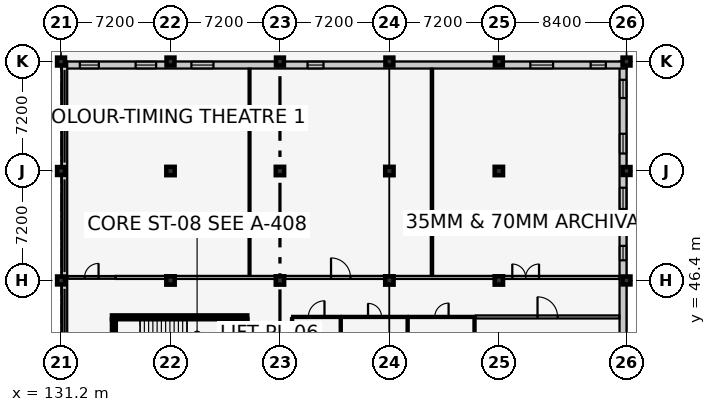
"""IFC4 building model, lengths in metres.
Left out: names, types, materials, properties, quantities, classifications, styles, units other than length and angle.
Written with IfcOpenShell. Run it as: python <this file> out.ifc"""

import sys

from ifc_helpers import new_model, si_unit, direction, frame, frame_2d, origin, origin_2d, place, context, subcontext, project, spatial, rectangle, extrude, element, fill, save


model = new_model("IFC4")
c1 = context("Model", 3, precision=1e-05, world=origin(), true_north=direction((0.0, 1.0)))
c2 = subcontext(c1, "Body", "Model", "MODEL_VIEW")
j1 = project(units=[si_unit("LENGTHUNIT", "METRE"), si_unit("PLANEANGLEUNIT", "RADIAN")], contexts=[c1])
p1 = place(None, origin())
s1 = spatial("IfcSite", under=j1, at=p1, CompositionType="ELEMENT")
p2 = place(p1, origin())
s2 = spatial("IfcBuilding", under=s1, at=p2, CompositionType="ELEMENT")
p3 = place(p2, frame((0.0, 0.0, 5.4)))
s3 = spatial("IfcBuildingStorey", under=s2, at=p3, CompositionType="ELEMENT", Elevation=5.4)
for number, where, z_axis, x_axis in (
    (1, (131.2, 46.4, 0.0), (0.0, 0.0, 1.0), (1.0, 0.0, 0.0)),
    (2, (131.2, 53.6, 0.0), (0.0, 0.0, 1.0), (1.0, 0.0, 0.0)),
    (3, (131.2, 60.8, 0.0), (0.0, 0.0, 1.0), (1.0, 0.0, 0.0)),
):
    element("IfcColumn", number, at=place(p3, frame(where, z_axis=z_axis, x_axis=x_axis)), inside=s3, PredefinedType="COLUMN", context=c2, shape_type="SweptSolid", body=[
        extrude(rectangle(XDim=0.52, YDim=0.52, at=origin_2d()), origin(), (0.0, 0.0, 1.0), 4.2),
    ])
for number, where, z_axis, x_axis in (
    (4, (138.4, 46.4, 0.0), (0.0, 0.0, 1.0), (1.0, 0.0, 0.0)),
    (5, (138.4, 53.6, 0.0), (0.0, 0.0, 1.0), (1.0, 0.0, 0.0)),
):
    element("IfcColumn", number, at=place(p3, frame(where, z_axis=z_axis, x_axis=x_axis)), inside=s3, PredefinedType="COLUMN", context=c2, shape_type="SweptSolid", body=[
        extrude(rectangle(XDim=0.55, YDim=0.55, at=origin_2d()), origin(), (0.0, 0.0, 1.0), 4.2),
    ])
p4 = place(p3, frame((138.4, 60.8, 0.0), z_axis=(0.0, 0.0, 1.0), x_axis=(1.0, 0.0, 0.0)))
e6 = element("IfcColumn", 6, at=p4, inside=s3, PredefinedType="COLUMN", context=c2, shape_type="SweptSolid", body=[
    extrude(rectangle(XDim=0.52, YDim=0.52, at=origin_2d()), origin(), (0.0, 0.0, 1.0), 4.2),
])
for number, where, z_axis, x_axis in (
    (7, (145.6, 46.4, 0.0), (0.0, 0.0, 1.0), (1.0, 0.0, 0.0)),
    (8, (145.6, 53.6, 0.0), (0.0, 0.0, 1.0), (1.0, 0.0, 0.0)),
):
    element("IfcColumn", number, at=place(p3, frame(where, z_axis=z_axis, x_axis=x_axis)), inside=s3, PredefinedType="COLUMN", context=c2, shape_type="SweptSolid", body=[
        extrude(rectangle(XDim=0.55, YDim=0.55, at=origin_2d()), origin(), (0.0, 0.0, 1.0), 4.2),
    ])
p5 = place(p3, frame((145.6, 60.8, 0.0), z_axis=(0.0, 0.0, 1.0), x_axis=(1.0, 0.0, 0.0)))
e9 = element("IfcColumn", 9, at=p5, inside=s3, PredefinedType="COLUMN", context=c2, shape_type="SweptSolid", body=[
    extrude(rectangle(XDim=0.52, YDim=0.52, at=origin_2d()), origin(), (0.0, 0.0, 1.0), 4.2),
])
for number, where, z_axis, x_axis in (
    (10, (152.8, 46.4, 0.0), (0.0, 0.0, 1.0), (1.0, 0.0, 0.0)),
    (11, (152.8, 53.6, 0.0), (0.0, 0.0, 1.0), (1.0, 0.0, 0.0)),
):
    element("IfcColumn", number, at=place(p3, frame(where, z_axis=z_axis, x_axis=x_axis)), inside=s3, PredefinedType="COLUMN", context=c2, shape_type="SweptSolid", body=[
        extrude(rectangle(XDim=0.55, YDim=0.55, at=origin_2d()), origin(), (0.0, 0.0, 1.0), 4.2),
    ])
p6 = place(p3, frame((152.8, 60.8, 0.0), z_axis=(0.0, 0.0, 1.0), x_axis=(1.0, 0.0, 0.0)))
e12 = element("IfcColumn", 12, at=p6, inside=s3, PredefinedType="COLUMN", context=c2, shape_type="SweptSolid", body=[
    extrude(rectangle(XDim=0.52, YDim=0.52, at=origin_2d()), origin(), (0.0, 0.0, 1.0), 4.2),
])
for number, where, z_axis, x_axis in (
    (13, (160.0, 46.4, 0.0), (0.0, 0.0, 1.0), (1.0, 0.0, 0.0)),
    (14, (160.0, 53.6, 0.0), (0.0, 0.0, 1.0), (1.0, 0.0, 0.0)),
):
    element("IfcColumn", number, at=place(p3, frame(where, z_axis=z_axis, x_axis=x_axis)), inside=s3, PredefinedType="COLUMN", context=c2, shape_type="SweptSolid", body=[
        extrude(rectangle(XDim=0.55, YDim=0.55, at=origin_2d()), origin(), (0.0, 0.0, 1.0), 4.2),
    ])
for number, where, z_axis, x_axis in (
    (15, (160.0, 60.8, 0.0), (0.0, 0.0, 1.0), (1.0, 0.0, 0.0)),
    (16, (168.4, 46.4, 0.0), (0.0, 0.0, 1.0), (1.0, 0.0, 0.0)),
    (17, (168.4, 53.6, 0.0), (0.0, 0.0, 1.0), (1.0, 0.0, 0.0)),
    (18, (168.4, 60.8, 0.0), (0.0, 0.0, 1.0), (1.0, 0.0, 0.0)),
):
    element("IfcColumn", number, at=place(p3, frame(where, z_axis=z_axis, x_axis=x_axis)), inside=s3, PredefinedType="COLUMN", context=c2, shape_type="SweptSolid", body=[
        extrude(rectangle(XDim=0.52, YDim=0.52, at=origin_2d()), origin(), (0.0, 0.0, 1.0), 4.2),
    ])
p7 = place(p3, frame((168.17, 60.8, 0.0), z_axis=(0.0, 0.0, 1.0), x_axis=(0.0, -1.0, 0.0)))
e19 = element("IfcWall", 19, at=p7, inside=s3, PredefinedType="SOLIDWALL", context=c2, shape_type="SweptSolid", body=[
    extrude(rectangle(XDim=21.6, YDim=0.46, at=frame_2d((10.8, 0.0))), origin(), (0.0, 0.0, 1.0), 3.215),
])
p8 = place(p7, frame((1.2, 0.0, 0.9)))
e20 = element("IfcOpeningElement", 20, at=p8, cuts=e19, PredefinedType="OPENING", context=c2, shape_type="SweptSolid", body=[
    extrude(rectangle(XDim=1.2, YDim=1.35, at=frame_2d((0.6, 0.675))), frame((0.0, 0.242, 0.0), z_axis=(0.0, -1.0, 0.0), x_axis=(1.0, 0.0, 0.0)), (0.0, 0.0, 1.0), 0.484),
])
p9 = place(p7, frame((4.75, 0.0, 0.9)))
e21 = element("IfcOpeningElement", 21, at=p9, cuts=e19, PredefinedType="OPENING", context=c2, shape_type="SweptSolid", body=[
    extrude(rectangle(XDim=1.3, YDim=1.35, at=frame_2d((0.65, 0.675))), frame((0.0, 0.242, 0.0), z_axis=(0.0, -1.0, 0.0), x_axis=(1.0, 0.0, 0.0)), (0.0, 0.0, 1.0), 0.484),
])
p10 = place(p7, frame((8.3, 0.0, 0.9)))
e22 = element("IfcOpeningElement", 22, at=p10, cuts=e19, PredefinedType="OPENING", context=c2, shape_type="SweptSolid", body=[
    extrude(rectangle(XDim=1.4, YDim=1.35, at=frame_2d((0.7, 0.675))), frame((0.0, 0.242, 0.0), z_axis=(0.0, -1.0, 0.0), x_axis=(1.0, 0.0, 0.0)), (0.0, 0.0, 1.0), 0.484),
])
p11 = place(p7, frame((12.125, 0.0, 0.9)))
e23 = element("IfcOpeningElement", 23, at=p11, cuts=e19, PredefinedType="OPENING", context=c2, shape_type="SweptSolid", body=[
    extrude(rectangle(XDim=0.95, YDim=1.45, at=frame_2d((0.475, 0.725))), frame((0.0, 0.242, 0.0), z_axis=(0.0, -1.0, 0.0), x_axis=(1.0, 0.0, 0.0)), (0.0, 0.0, 1.0), 0.484),
])
p12 = place(p7, frame((19.225, 0.0, 0.9)))
e24 = element("IfcOpeningElement", 24, at=p12, cuts=e19, PredefinedType="OPENING", context=c2, shape_type="SweptSolid", body=[
    extrude(rectangle(XDim=1.15, YDim=1.45, at=frame_2d((0.575, 0.725))), frame((0.0, 0.242, 0.0), z_axis=(0.0, -1.0, 0.0), x_axis=(1.0, 0.0, 0.0)), (0.0, 0.0, 1.0), 0.484),
])
p13 = place(p3, frame((131.2, 60.57, 0.0), z_axis=(0.0, 0.0, 1.0), x_axis=(1.0, 0.0, 0.0)))
e25 = element("IfcWall", 25, at=p13, inside=s3, PredefinedType="SOLIDWALL", context=c2, shape_type="SweptSolid", body=[
    extrude(rectangle(XDim=37.2, YDim=0.46, at=frame_2d((18.6, 0.0))), origin(), (0.0, 0.0, 1.0), 3.115),
])
p14 = place(p13, frame((1.235, 0.0, 0.9)))
e26 = element("IfcOpeningElement", 26, at=p14, cuts=e25, PredefinedType="OPENING", context=c2, shape_type="SweptSolid", body=[
    extrude(rectangle(XDim=1.25, YDim=1.45, at=frame_2d((0.625, 0.725))), frame((0.0, 0.242, 0.0), z_axis=(0.0, -1.0, 0.0), x_axis=(1.0, 0.0, 0.0)), (0.0, 0.0, 1.0), 0.484),
])
p15 = place(p13, frame((4.905, 0.0, 0.9)))
e27 = element("IfcOpeningElement", 27, at=p15, cuts=e25, PredefinedType="OPENING", context=c2, shape_type="SweptSolid", body=[
    extrude(rectangle(XDim=1.35, YDim=1.45, at=frame_2d((0.675, 0.725))), frame((0.0, 0.242, 0.0), z_axis=(0.0, -1.0, 0.0), x_axis=(1.0, 0.0, 0.0)), (0.0, 0.0, 1.0), 0.484),
])
p16 = place(p13, frame((8.575, 0.0, 0.9)))
e28 = element("IfcOpeningElement", 28, at=p16, cuts=e25, PredefinedType="OPENING", context=c2, shape_type="SweptSolid", body=[
    extrude(rectangle(XDim=1.45, YDim=1.45, at=frame_2d((0.725, 0.725))), frame((0.0, 0.242, 0.0), z_axis=(0.0, -1.0, 0.0), x_axis=(1.0, 0.0, 0.0)), (0.0, 0.0, 1.0), 0.484),
])
p17 = place(p13, frame((16.215, 0.0, 0.9)))
e29 = element("IfcOpeningElement", 29, at=p17, cuts=e25, PredefinedType="OPENING", context=c2, shape_type="SweptSolid", body=[
    extrude(rectangle(XDim=1.05, YDim=1.6, at=frame_2d((0.525, 0.8))), frame((0.0, 0.242, 0.0), z_axis=(0.0, -1.0, 0.0), x_axis=(1.0, 0.0, 0.0)), (0.0, 0.0, 1.0), 0.484),
])
p18 = place(p13, frame((30.87, 0.0, 0.9)))
e30 = element("IfcOpeningElement", 30, at=p18, cuts=e25, PredefinedType="OPENING", context=c2, shape_type="SweptSolid", body=[
    extrude(rectangle(XDim=1.5, YDim=1.6, at=frame_2d((0.75, 0.8))), frame((0.0, 0.242, 0.0), z_axis=(0.0, -1.0, 0.0), x_axis=(1.0, 0.0, 0.0)), (0.0, 0.0, 1.0), 0.484),
])
p19 = place(p13, frame((34.84, 0.0, 0.9)))
e31 = element("IfcOpeningElement", 31, at=p19, cuts=e25, PredefinedType="OPENING", context=c2, shape_type="SweptSolid", body=[
    extrude(rectangle(XDim=1.0, YDim=1.75, at=frame_2d((0.5, 0.875))), frame((0.0, 0.242, 0.0), z_axis=(0.0, -1.0, 0.0), x_axis=(1.0, 0.0, 0.0)), (0.0, 0.0, 1.0), 0.484),
])
p20 = place(p3, frame((131.43, 39.2, 0.0), z_axis=(0.0, 0.0, 1.0), x_axis=(0.0, 1.0, 0.0)))
e32 = element("IfcWall", 32, at=p20, inside=s3, PredefinedType="SOLIDWALL", context=c2, shape_type="SweptSolid", body=[
    extrude(rectangle(XDim=21.6, YDim=0.35, at=frame_2d((10.8, 0.0))), origin(), (0.0, 0.0, 1.0), 0.85),
])
p21 = place(p3, frame((143.45, 43.975, 0.0), z_axis=(0.0, 0.0, 1.0), x_axis=(-1.0, 0.0, 0.0)))
e33 = element("IfcWall", 33, at=p21, inside=s3, PredefinedType="SHEAR", context=c2, shape_type="SweptSolid", body=[
    extrude(rectangle(XDim=8.9, YDim=0.25, at=frame_2d((4.45, 0.0))), origin(), (0.0, 0.0, 1.0), 3.96),
])
p22 = place(p3, frame((134.675, 43.85, 0.0), z_axis=(0.0, 0.0, 1.0), x_axis=(0.0, -1.0, 0.0)))
e34 = element("IfcWall", 34, at=p22, inside=s3, PredefinedType="SHEAR", context=c2, shape_type="SweptSolid", body=[
    extrude(rectangle(XDim=3.45, YDim=0.25, at=frame_2d((1.725, 0.0))), origin(), (0.0, 0.0, 1.0), 3.96),
])
p23 = place(p22, frame((1.125, 0.0, 0.0)))
e35 = element("IfcOpeningElement", 35, at=p23, cuts=e34, PredefinedType="OPENING", context=c2, shape_type="SweptSolid", body=[
    extrude(rectangle(XDim=1.2, YDim=2.15, at=frame_2d((0.6, 1.075))), frame((0.0, 0.137, 0.0), z_axis=(0.0, -1.0, 0.0), x_axis=(1.0, 0.0, 0.0)), (0.0, 0.0, 1.0), 0.274),
])
p24 = place(p3, frame((143.325, 40.4, 0.0), z_axis=(0.0, 0.0, 1.0), x_axis=(0.0, 1.0, 0.0)))
e36 = element("IfcWall", 36, at=p24, inside=s3, PredefinedType="SHEAR", context=c2, shape_type="SweptSolid", body=[
    extrude(rectangle(XDim=3.45, YDim=0.25, at=frame_2d((1.725, 0.0))), origin(), (0.0, 0.0, 1.0), 3.96),
])
p25 = place(p3, frame((131.615, 46.6, 0.0), z_axis=(0.0, 0.0, 1.0), x_axis=(1.0, 0.0, 0.0)))
e37 = element("IfcWall", 37, at=p25, inside=s3, PredefinedType="PARTITIONING", context=c2, shape_type="SweptSolid", body=[
    extrude(rectangle(XDim=3.185, YDim=0.18, at=frame_2d((1.593, 0.0))), origin(), (0.0, 0.0, 1.0), 3.285),
])
p26 = place(p25, frame((1.133, 0.0, 0.0)))
e38 = element("IfcOpeningElement", 38, at=p26, cuts=e37, PredefinedType="OPENING", context=c2, shape_type="SweptSolid", body=[
    extrude(rectangle(XDim=0.92, YDim=2.08, at=frame_2d((0.46, 1.04))), frame((0.0, 0.102, 0.0), z_axis=(0.0, -1.0, 0.0), x_axis=(1.0, 0.0, 0.0)), (0.0, 0.0, 1.0), 0.204),
])
p27 = place(p3, frame((134.8, 46.6, 0.0), z_axis=(0.0, 0.0, 1.0), x_axis=(1.0, 0.0, 0.0)))
e39 = element("IfcWall", 39, at=p27, inside=s3, PredefinedType="PARTITIONING", context=c2, shape_type="SweptSolid", body=[
    extrude(rectangle(XDim=33.13, YDim=0.2, at=frame_2d((16.565, 0.0))), origin(), (0.0, 0.0, 1.0), 2.935),
])
p28 = place(p27, frame((14.16, 0.0, 0.0)))
e40 = element("IfcOpeningElement", 40, at=p28, cuts=e39, PredefinedType="OPENING", context=c2, shape_type="SweptSolid", body=[
    extrude(rectangle(XDim=1.28, YDim=2.2, at=frame_2d((0.64, 1.1))), frame((0.0, 0.112, 0.0), z_axis=(0.0, -1.0, 0.0), x_axis=(1.0, 0.0, 0.0)), (0.0, 0.0, 1.0), 0.224),
])
p29 = place(p27, frame((26.085, 0.0, 0.0)))
e41 = element("IfcOpeningElement", 41, at=p29, cuts=e39, PredefinedType="OPENING", context=c2, shape_type="SweptSolid", body=[
    extrude(rectangle(XDim=1.76, YDim=2.3, at=frame_2d((0.88, 1.15))), frame((0.0, 0.112, 0.0), z_axis=(0.0, -1.0, 0.0), x_axis=(1.0, 0.0, 0.0)), (0.0, 0.0, 1.0), 0.224),
])
p30 = place(p3, frame((143.6, 46.71, 0.0), z_axis=(0.0, 0.0, 1.0), x_axis=(0.0, 1.0, 0.0)))
e42 = element("IfcWall", 42, at=p30, inside=s3, PredefinedType="PARTITIONING", context=c2, shape_type="SweptSolid", body=[
    extrude(rectangle(XDim=13.62, YDim=0.125, at=frame_2d((6.81, 0.0))), origin(), (0.0, 0.0, 1.0), 3.96),
])
p31 = place(p3, frame((155.6, 46.71, 0.0), z_axis=(0.0, 0.0, 1.0), x_axis=(0.0, 1.0, 0.0)))
e43 = element("IfcWall", 43, at=p31, inside=s3, PredefinedType="PARTITIONING", context=c2, shape_type="SweptSolid", body=[
    extrude(rectangle(XDim=13.62, YDim=0.15, at=frame_2d((6.81, 0.0))), origin(), (0.0, 0.0, 1.0), 3.96),
])
p32 = place(p3, frame((146.4, 44.0, 0.0), z_axis=(0.0, 0.0, 1.0), x_axis=(1.0, 0.0, 0.0)))
e44 = element("IfcWall", 44, at=p32, inside=s3, PredefinedType="PARTITIONING", context=c2, shape_type="SweptSolid", body=[
    extrude(rectangle(XDim=3.2, YDim=0.14, at=frame_2d((1.6, 0.0))), origin(), (0.0, 0.0, 1.0), 3.96),
])
p33 = place(p32, frame((1.07, 0.0, 0.0)))
e45 = element("IfcOpeningElement", 45, at=p33, cuts=e44, PredefinedType="OPENING", context=c2, shape_type="SweptSolid", body=[
    extrude(rectangle(XDim=1.06, YDim=2.1, at=frame_2d((0.53, 1.05))), frame((0.0, 0.082, 0.0), z_axis=(0.0, -1.0, 0.0), x_axis=(1.0, 0.0, 0.0)), (0.0, 0.0, 1.0), 0.164),
])
for number, where, z_axis, x_axis in (
    (46, (146.4, 39.67, 0.0), (0.0, 0.0, 1.0), (0.0, 1.0, 0.0)),
    (47, (149.6, 39.67, 0.0), (0.0, 0.0, 1.0), (0.0, 1.0, 0.0)),
):
    element("IfcWall", number, at=place(p3, frame(where, z_axis=z_axis, x_axis=x_axis)), inside=s3, PredefinedType="PARTITIONING", context=c2, shape_type="SweptSolid", body=[
        extrude(rectangle(XDim=4.25, YDim=0.14, at=frame_2d((2.125, 0.0))), origin(), (0.0, 0.0, 1.0), 3.96),
    ])
p34 = place(p3, frame((149.68, 44.0, 0.0), z_axis=(0.0, 0.0, 1.0), x_axis=(1.0, 0.0, 0.0)))
e48 = element("IfcWall", 48, at=p34, inside=s3, PredefinedType="PARTITIONING", context=c2, shape_type="SweptSolid", body=[
    extrude(rectangle(XDim=4.32, YDim=0.14, at=frame_2d((2.16, 0.0))), origin(), (0.0, 0.0, 1.0), 3.96),
])
p35 = place(p34, frame((1.715, 0.0, 0.0)))
e49 = element("IfcOpeningElement", 49, at=p35, cuts=e48, PredefinedType="OPENING", context=c2, shape_type="SweptSolid", body=[
    extrude(rectangle(XDim=0.89, YDim=2.05, at=frame_2d((0.445, 1.025))), frame((0.0, 0.082, 0.0), z_axis=(0.0, -1.0, 0.0), x_axis=(1.0, 0.0, 0.0)), (0.0, 0.0, 1.0), 0.164),
])
p36 = place(p3, frame((154.0, 39.67, 0.0), z_axis=(0.0, 0.0, 1.0), x_axis=(0.0, 1.0, 0.0)))
e50 = element("IfcWall", 50, at=p36, inside=s3, PredefinedType="PARTITIONING", context=c2, shape_type="SweptSolid", body=[
    extrude(rectangle(XDim=4.25, YDim=0.14, at=frame_2d((2.125, 0.0))), origin(), (0.0, 0.0, 1.0), 3.96),
])
p37 = place(p3, frame((154.08, 44.0, 0.0), z_axis=(0.0, 0.0, 1.0), x_axis=(1.0, 0.0, 0.0)))
e51 = element("IfcWall", 51, at=p37, inside=s3, PredefinedType="PARTITIONING", context=c2, shape_type="SweptSolid", body=[
    extrude(rectangle(XDim=4.32, YDim=0.14, at=frame_2d((2.16, 0.0))), origin(), (0.0, 0.0, 1.0), 3.96),
])
p38 = place(p37, frame((1.705, 0.0, 0.0)))
e52 = element("IfcOpeningElement", 52, at=p38, cuts=e51, PredefinedType="OPENING", context=c2, shape_type="SweptSolid", body=[
    extrude(rectangle(XDim=0.91, YDim=2.06, at=frame_2d((0.455, 1.03))), frame((0.0, 0.082, 0.0), z_axis=(0.0, -1.0, 0.0), x_axis=(1.0, 0.0, 0.0)), (0.0, 0.0, 1.0), 0.164),
])
p39 = place(p3, frame((158.4, 39.67, 0.0), z_axis=(0.0, 0.0, 1.0), x_axis=(0.0, 1.0, 0.0)))
e53 = element("IfcWall", 53, at=p39, inside=s3, PredefinedType="PARTITIONING", context=c2, shape_type="SweptSolid", body=[
    extrude(rectangle(XDim=4.25, YDim=0.14, at=frame_2d((2.125, 0.0))), origin(), (0.0, 0.0, 1.0), 3.96),
])
p40 = place(p3, frame((158.48, 44.0, 0.0), z_axis=(0.0, 0.0, 1.0), x_axis=(1.0, 0.0, 0.0)))
e54 = element("IfcWall", 54, at=p40, inside=s3, PredefinedType="PARTITIONING", context=c2, shape_type="SweptSolid", body=[
    extrude(rectangle(XDim=9.45, YDim=0.2, at=frame_2d((4.725, 0.0))), origin(), (0.0, 0.0, 1.0), 3.96),
])
p41 = place(p40, frame((4.065, 0.0, 0.0)))
e55 = element("IfcOpeningElement", 55, at=p41, cuts=e54, PredefinedType="OPENING", context=c2, shape_type="SweptSolid", body=[
    extrude(rectangle(XDim=1.32, YDim=2.15, at=frame_2d((0.66, 1.075))), frame((0.0, 0.112, 0.0), z_axis=(0.0, -1.0, 0.0), x_axis=(1.0, 0.0, 0.0)), (0.0, 0.0, 1.0), 0.224),
])
p42 = place(p8, origin())
e56 = element("IfcWindow", 56, at=p42, inside=s3, PartitioningType="SINGLE_PANEL", PredefinedType="WINDOW", context=c2, shape_type="SweptSolid", body=[
    extrude(rectangle(XDim=1.2, YDim=1.35, at=frame_2d((0.6, 0.675))), frame((0.0, 0.03, 0.0), z_axis=(0.0, -1.0, 0.0), x_axis=(1.0, 0.0, 0.0)), (0.0, 0.0, 1.0), 0.06),
])
fill(e20, e56)
p43 = place(p9, origin())
e57 = element("IfcWindow", 57, at=p43, inside=s3, PartitioningType="SINGLE_PANEL", PredefinedType="WINDOW", context=c2, shape_type="SweptSolid", body=[
    extrude(rectangle(XDim=1.3, YDim=1.35, at=frame_2d((0.65, 0.675))), frame((0.0, 0.03, 0.0), z_axis=(0.0, -1.0, 0.0), x_axis=(1.0, 0.0, 0.0)), (0.0, 0.0, 1.0), 0.06),
])
fill(e21, e57)
p44 = place(p10, origin())
e58 = element("IfcWindow", 58, at=p44, inside=s3, PartitioningType="SINGLE_PANEL", PredefinedType="WINDOW", context=c2, shape_type="SweptSolid", body=[
    extrude(rectangle(XDim=1.4, YDim=1.35, at=frame_2d((0.7, 0.675))), frame((0.0, 0.03, 0.0), z_axis=(0.0, -1.0, 0.0), x_axis=(1.0, 0.0, 0.0)), (0.0, 0.0, 1.0), 0.06),
])
fill(e22, e58)
p45 = place(p11, origin())
e59 = element("IfcWindow", 59, at=p45, inside=s3, PartitioningType="SINGLE_PANEL", PredefinedType="WINDOW", context=c2, shape_type="SweptSolid", body=[
    extrude(rectangle(XDim=0.95, YDim=1.45, at=frame_2d((0.475, 0.725))), frame((0.0, 0.03, 0.0), z_axis=(0.0, -1.0, 0.0), x_axis=(1.0, 0.0, 0.0)), (0.0, 0.0, 1.0), 0.06),
])
fill(e23, e59)
p46 = place(p14, origin())
e60 = element("IfcWindow", 60, at=p46, inside=s3, PartitioningType="SINGLE_PANEL", PredefinedType="WINDOW", context=c2, shape_type="SweptSolid", body=[
    extrude(rectangle(XDim=1.25, YDim=1.45, at=frame_2d((0.625, 0.725))), frame((0.0, 0.03, 0.0), z_axis=(0.0, -1.0, 0.0), x_axis=(1.0, 0.0, 0.0)), (0.0, 0.0, 1.0), 0.06),
])
fill(e26, e60)
p47 = place(p15, origin())
e61 = element("IfcWindow", 61, at=p47, inside=s3, PartitioningType="SINGLE_PANEL", PredefinedType="WINDOW", context=c2, shape_type="SweptSolid", body=[
    extrude(rectangle(XDim=1.35, YDim=1.45, at=frame_2d((0.675, 0.725))), frame((0.0, 0.03, 0.0), z_axis=(0.0, -1.0, 0.0), x_axis=(1.0, 0.0, 0.0)), (0.0, 0.0, 1.0), 0.06),
])
fill(e27, e61)
p48 = place(p16, origin())
e62 = element("IfcWindow", 62, at=p48, inside=s3, PartitioningType="SINGLE_PANEL", PredefinedType="WINDOW", context=c2, shape_type="SweptSolid", body=[
    extrude(rectangle(XDim=1.45, YDim=1.45, at=frame_2d((0.725, 0.725))), frame((0.0, 0.03, 0.0), z_axis=(0.0, -1.0, 0.0), x_axis=(1.0, 0.0, 0.0)), (0.0, 0.0, 1.0), 0.06),
])
fill(e28, e62)
p49 = place(p17, origin())
e63 = element("IfcWindow", 63, at=p49, inside=s3, PartitioningType="SINGLE_PANEL", PredefinedType="WINDOW", context=c2, shape_type="SweptSolid", body=[
    extrude(rectangle(XDim=1.05, YDim=1.6, at=frame_2d((0.525, 0.8))), frame((0.0, 0.03, 0.0), z_axis=(0.0, -1.0, 0.0), x_axis=(1.0, 0.0, 0.0)), (0.0, 0.0, 1.0), 0.06),
])
fill(e29, e63)
p50 = place(p18, origin())
e64 = element("IfcWindow", 64, at=p50, inside=s3, PartitioningType="SINGLE_PANEL", PredefinedType="WINDOW", context=c2, shape_type="SweptSolid", body=[
    extrude(rectangle(XDim=1.5, YDim=1.6, at=frame_2d((0.75, 0.8))), frame((0.0, 0.03, 0.0), z_axis=(0.0, -1.0, 0.0), x_axis=(1.0, 0.0, 0.0)), (0.0, 0.0, 1.0), 0.06),
])
fill(e30, e64)
p51 = place(p19, origin())
e65 = element("IfcWindow", 65, at=p51, inside=s3, PartitioningType="SINGLE_PANEL", PredefinedType="WINDOW", context=c2, shape_type="SweptSolid", body=[
    extrude(rectangle(XDim=1.0, YDim=1.75, at=frame_2d((0.5, 0.875))), frame((0.0, 0.03, 0.0), z_axis=(0.0, -1.0, 0.0), x_axis=(1.0, 0.0, 0.0)), (0.0, 0.0, 1.0), 0.06),
])
fill(e31, e65)
p52 = place(p26, origin())
e66 = element("IfcDoor", 66, at=p52, inside=s3, OperationType="SINGLE_SWING_RIGHT", PredefinedType="DOOR", context=c2, shape_type="SweptSolid", body=[
    extrude(rectangle(XDim=0.92, YDim=2.08, at=frame_2d((0.46, 1.04))), frame((0.0, 0.025, 0.0), z_axis=(0.0, -1.0, 0.0), x_axis=(1.0, 0.0, 0.0)), (0.0, 0.0, 1.0), 0.05),
])
fill(e38, e66)
p53 = place(p28, origin())
e67 = element("IfcDoor", 67, at=p53, inside=s3, OperationType="SINGLE_SWING_LEFT", PredefinedType="DOOR", context=c2, shape_type="SweptSolid", body=[
    extrude(rectangle(XDim=1.28, YDim=2.2, at=frame_2d((0.64, 1.1))), frame((0.0, 0.025, 0.0), z_axis=(0.0, -1.0, 0.0), x_axis=(1.0, 0.0, 0.0)), (0.0, 0.0, 1.0), 0.05),
])
fill(e40, e67)
p54 = place(p29, origin())
e68 = element("IfcDoor", 68, at=p54, inside=s3, OperationType="DOUBLE_DOOR_SINGLE_SWING", PredefinedType="DOOR", context=c2, shape_type="SweptSolid", body=[
    extrude(rectangle(XDim=1.76, YDim=2.3, at=frame_2d((0.88, 1.15))), frame((0.0, 0.025, 0.0), z_axis=(0.0, -1.0, 0.0), x_axis=(1.0, 0.0, 0.0)), (0.0, 0.0, 1.0), 0.05),
])
fill(e41, e68)
p55 = place(p33, origin())
e69 = element("IfcDoor", 69, at=p55, inside=s3, OperationType="SINGLE_SWING_RIGHT", PredefinedType="DOOR", context=c2, shape_type="SweptSolid", body=[
    extrude(rectangle(XDim=1.06, YDim=2.1, at=frame_2d((0.53, 1.05))), frame((0.0, 0.025, 0.0), z_axis=(0.0, -1.0, 0.0), x_axis=(1.0, 0.0, 0.0)), (0.0, 0.0, 1.0), 0.05),
])
fill(e45, e69)
p56 = place(p35, origin())
e70 = element("IfcDoor", 70, at=p56, inside=s3, OperationType="SINGLE_SWING_LEFT", PredefinedType="DOOR", context=c2, shape_type="SweptSolid", body=[
    extrude(rectangle(XDim=0.89, YDim=2.05, at=frame_2d((0.445, 1.025))), frame((0.0, 0.025, 0.0), z_axis=(0.0, -1.0, 0.0), x_axis=(1.0, 0.0, 0.0)), (0.0, 0.0, 1.0), 0.05),
])
fill(e49, e70)
p57 = place(p38, origin())
e71 = element("IfcDoor", 71, at=p57, inside=s3, OperationType="SINGLE_SWING_RIGHT", PredefinedType="DOOR", context=c2, shape_type="SweptSolid", body=[
    extrude(rectangle(XDim=0.91, YDim=2.06, at=frame_2d((0.455, 1.03))), frame((0.0, 0.025, 0.0), z_axis=(0.0, -1.0, 0.0), x_axis=(1.0, 0.0, 0.0)), (0.0, 0.0, 1.0), 0.05),
])
fill(e52, e71)
p58 = place(p41, origin())
e72 = element("IfcDoor", 72, at=p58, inside=s3, OperationType="SINGLE_SWING_LEFT", PredefinedType="DOOR", context=c2, shape_type="SweptSolid", body=[
    extrude(rectangle(XDim=1.32, YDim=2.15, at=frame_2d((0.66, 1.075))), frame((0.0, 0.025, 0.0), z_axis=(0.0, -1.0, 0.0), x_axis=(1.0, 0.0, 0.0)), (0.0, 0.0, 1.0), 0.05),
])
fill(e55, e72)
save(model, sys.argv[1])
